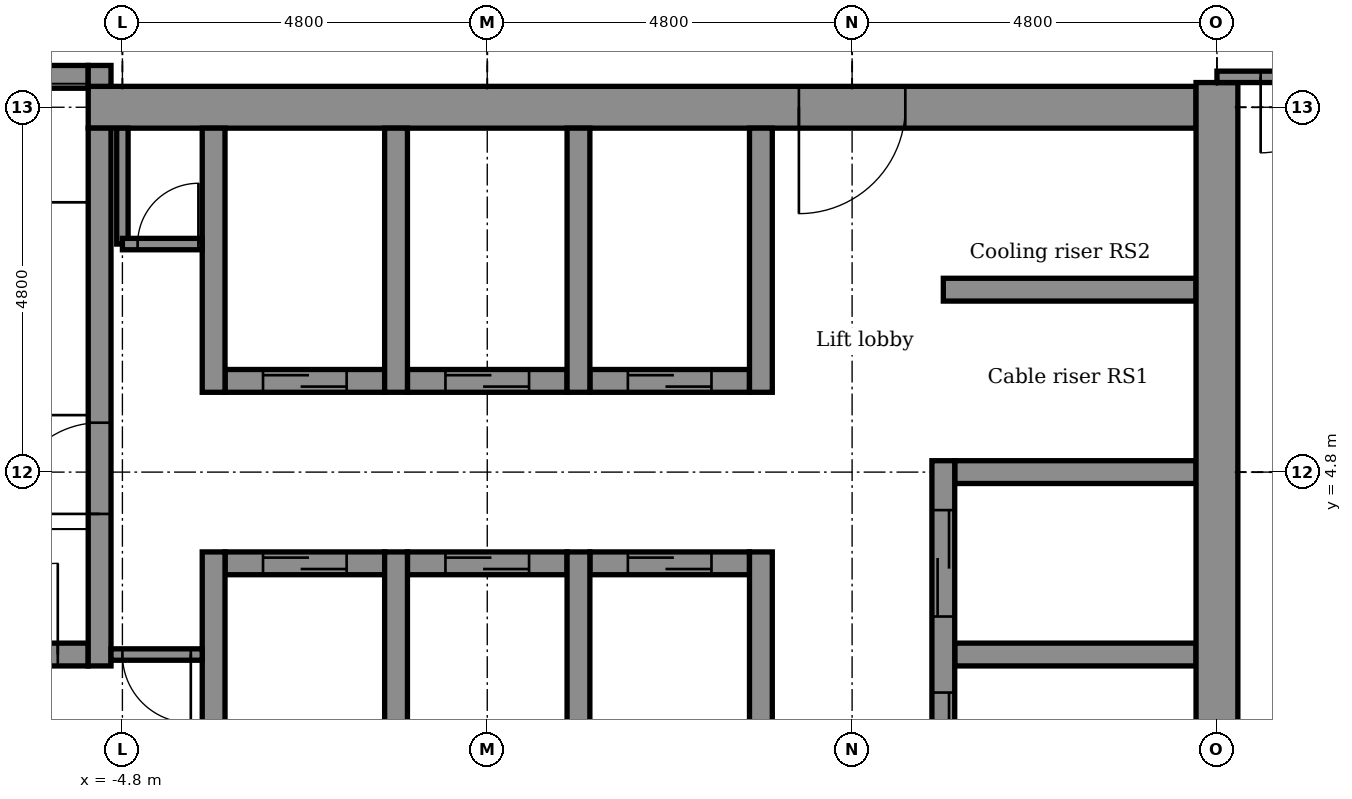
"""IFC4 building model, lengths in metres.
Left out: names, types, materials, properties, quantities, classifications, styles, units other than length and angle.
Written with IfcOpenShell. Run it as: python <this file> out.ifc"""

import sys

from ifc_helpers import new_model, si_unit, direction, frame, frame_2d, origin, place, context, subcontext, project, spatial, rectangle, extrude, element, fill, save


model = new_model("IFC4")
c1 = context("Model", 3, precision=1e-05, world=origin(), true_north=direction((0.0, 1.0)))
c2 = subcontext(c1, "Body", "Model", "MODEL_VIEW")
j1 = project(units=[si_unit("LENGTHUNIT", "METRE"), si_unit("PLANEANGLEUNIT", "RADIAN")], contexts=[c1])
p1 = place(None, origin())
s1 = spatial("IfcSite", under=j1, at=p1, CompositionType="ELEMENT")
p2 = place(p1, origin())
s2 = spatial("IfcBuilding", under=s1, at=p2, CompositionType="ELEMENT")
p3 = place(p2, frame((0.0, 0.0, 238.4)))
s3 = spatial("IfcBuildingStorey", under=s2, at=p3, CompositionType="ELEMENT", Elevation=238.4)
p4 = place(p3, frame((-7.25, 2.4, -0.15), z_axis=(0.0, 0.0, 1.0), x_axis=(1.0, 0.0, 0.0)))
e1 = element("IfcWall", 1, at=p4, inside=s3, PredefinedType="STANDARD", context=c2, shape_type="SweptSolid", body=[
    extrude(rectangle(XDim=2.0, YDim=0.3, at=frame_2d((1.0, 0.0))), origin(), (0.0, 0.0, 1.0), 3.9),
])
p5 = place(p4, frame((0.4, 0.0, 0.15)))
e2 = element("IfcOpeningElement", 2, at=p5, cuts=e1, PredefinedType="OPENING", context=c2, shape_type="SweptSolid", body=[
    extrude(rectangle(XDim=1.2, YDim=2.1, at=frame_2d((0.6, 1.05))), frame((0.0, 0.16, 0.0), z_axis=(0.0, -1.0, 0.0), x_axis=(1.0, 0.0, 0.0)), (0.0, 0.0, 1.0), 0.32),
])
p6 = place(p3, frame((6.15, 2.4, -0.15), z_axis=(0.0, 0.0, 1.0), x_axis=(1.0, 0.0, 0.0)))
e3 = element("IfcWall", 3, at=p6, inside=s3, PredefinedType="STANDARD", context=c2, shape_type="SweptSolid", body=[
    extrude(rectangle(XDim=3.175, YDim=0.3, at=frame_2d((1.587, 0.0))), origin(), (0.0, 0.0, 1.0), 3.9),
])
p7 = place(p3, frame((-3.45, 3.6, -0.15), z_axis=(0.0, 0.0, 1.0), x_axis=(1.0, 0.0, 0.0)))
e4 = element("IfcWall", 4, at=p7, inside=s3, PredefinedType="STANDARD", context=c2, shape_type="SweptSolid", body=[
    extrude(rectangle(XDim=2.1, YDim=0.3, at=frame_2d((1.05, 0.0))), origin(), (0.0, 0.0, 1.0), 3.9),
])
p8 = place(p7, frame((0.5, 0.0, 0.15)))
e5 = element("IfcOpeningElement", 5, at=p8, cuts=e4, PredefinedType="OPENING", context=c2, shape_type="SweptSolid", body=[
    extrude(rectangle(XDim=1.1, YDim=2.1, at=frame_2d((0.55, 1.05))), frame((0.0, 0.16, 0.0), z_axis=(0.0, -1.0, 0.0), x_axis=(1.0, 0.0, 0.0)), (0.0, 0.0, 1.0), 0.32),
])
p9 = place(p3, frame((-1.05, 3.6, -0.15), z_axis=(0.0, 0.0, 1.0), x_axis=(1.0, 0.0, 0.0)))
e6 = element("IfcWall", 6, at=p9, inside=s3, PredefinedType="STANDARD", context=c2, shape_type="SweptSolid", body=[
    extrude(rectangle(XDim=2.1, YDim=0.3, at=frame_2d((1.05, 0.0))), origin(), (0.0, 0.0, 1.0), 3.9),
])
p10 = place(p9, frame((0.5, 0.0, 0.15)))
e7 = element("IfcOpeningElement", 7, at=p10, cuts=e6, PredefinedType="OPENING", context=c2, shape_type="SweptSolid", body=[
    extrude(rectangle(XDim=1.1, YDim=2.1, at=frame_2d((0.55, 1.05))), frame((0.0, 0.16, 0.0), z_axis=(0.0, -1.0, 0.0), x_axis=(1.0, 0.0, 0.0)), (0.0, 0.0, 1.0), 0.32),
])
p11 = place(p3, frame((1.35, 3.6, -0.15), z_axis=(0.0, 0.0, 1.0), x_axis=(1.0, 0.0, 0.0)))
e8 = element("IfcWall", 8, at=p11, inside=s3, PredefinedType="STANDARD", context=c2, shape_type="SweptSolid", body=[
    extrude(rectangle(XDim=2.1, YDim=0.3, at=frame_2d((1.05, 0.0))), origin(), (0.0, 0.0, 1.0), 3.9),
])
p12 = place(p11, frame((0.5, 0.0, 0.15)))
e9 = element("IfcOpeningElement", 9, at=p12, cuts=e8, PredefinedType="OPENING", context=c2, shape_type="SweptSolid", body=[
    extrude(rectangle(XDim=1.1, YDim=2.1, at=frame_2d((0.55, 1.05))), frame((0.0, 0.16, 0.0), z_axis=(0.0, -1.0, 0.0), x_axis=(1.0, 0.0, 0.0)), (0.0, 0.0, 1.0), 0.32),
])
p13 = place(p3, frame((6.15, 4.8, -0.15), z_axis=(0.0, 0.0, 1.0), x_axis=(1.0, 0.0, 0.0)))
e10 = element("IfcWall", 10, at=p13, inside=s3, PredefinedType="STANDARD", context=c2, shape_type="SweptSolid", body=[
    extrude(rectangle(XDim=3.175, YDim=0.3, at=frame_2d((1.587, 0.0))), origin(), (0.0, 0.0, 1.0), 3.9),
])
p14 = place(p3, frame((-3.45, 6.0, -0.15), z_axis=(0.0, 0.0, 1.0), x_axis=(1.0, 0.0, 0.0)))
e11 = element("IfcWall", 11, at=p14, inside=s3, PredefinedType="STANDARD", context=c2, shape_type="SweptSolid", body=[
    extrude(rectangle(XDim=2.1, YDim=0.3, at=frame_2d((1.05, 0.0))), origin(), (0.0, 0.0, 1.0), 3.9),
])
p15 = place(p14, frame((0.5, 0.0, 0.15)))
e12 = element("IfcOpeningElement", 12, at=p15, cuts=e11, PredefinedType="OPENING", context=c2, shape_type="SweptSolid", body=[
    extrude(rectangle(XDim=1.1, YDim=2.1, at=frame_2d((0.55, 1.05))), frame((0.0, 0.16, 0.0), z_axis=(0.0, -1.0, 0.0), x_axis=(1.0, 0.0, 0.0)), (0.0, 0.0, 1.0), 0.32),
])
p16 = place(p3, frame((-1.05, 6.0, -0.15), z_axis=(0.0, 0.0, 1.0), x_axis=(1.0, 0.0, 0.0)))
e13 = element("IfcWall", 13, at=p16, inside=s3, PredefinedType="STANDARD", context=c2, shape_type="SweptSolid", body=[
    extrude(rectangle(XDim=2.1, YDim=0.3, at=frame_2d((1.05, 0.0))), origin(), (0.0, 0.0, 1.0), 3.9),
])
p17 = place(p16, frame((0.5, 0.0, 0.15)))
e14 = element("IfcOpeningElement", 14, at=p17, cuts=e13, PredefinedType="OPENING", context=c2, shape_type="SweptSolid", body=[
    extrude(rectangle(XDim=1.1, YDim=2.1, at=frame_2d((0.55, 1.05))), frame((0.0, 0.16, 0.0), z_axis=(0.0, -1.0, 0.0), x_axis=(1.0, 0.0, 0.0)), (0.0, 0.0, 1.0), 0.32),
])
p18 = place(p3, frame((1.35, 6.0, -0.15), z_axis=(0.0, 0.0, 1.0), x_axis=(1.0, 0.0, 0.0)))
e15 = element("IfcWall", 15, at=p18, inside=s3, PredefinedType="STANDARD", context=c2, shape_type="SweptSolid", body=[
    extrude(rectangle(XDim=2.1, YDim=0.3, at=frame_2d((1.05, 0.0))), origin(), (0.0, 0.0, 1.0), 3.9),
])
p19 = place(p18, frame((0.5, 0.0, 0.15)))
e16 = element("IfcOpeningElement", 16, at=p19, cuts=e15, PredefinedType="OPENING", context=c2, shape_type="SweptSolid", body=[
    extrude(rectangle(XDim=1.1, YDim=2.1, at=frame_2d((0.55, 1.05))), frame((0.0, 0.16, 0.0), z_axis=(0.0, -1.0, 0.0), x_axis=(1.0, 0.0, 0.0)), (0.0, 0.0, 1.0), 0.32),
])
p20 = place(p3, frame((6.0, 7.2, -0.15), z_axis=(0.0, 0.0, 1.0), x_axis=(1.0, 0.0, 0.0)))
e17 = element("IfcWall", 17, at=p20, inside=s3, PredefinedType="STANDARD", context=c2, shape_type="SweptSolid", body=[
    extrude(rectangle(XDim=3.325, YDim=0.3, at=frame_2d((1.663, 0.0))), origin(), (0.0, 0.0, 1.0), 3.9),
])
p21 = place(p3, frame((-5.25, 9.6, -0.15), z_axis=(0.0, 0.0, 1.0), x_axis=(1.0, 0.0, 0.0)))
e18 = element("IfcWall", 18, at=p21, inside=s3, PredefinedType="SHEAR", context=c2, shape_type="SweptSolid", body=[
    extrude(rectangle(XDim=14.575, YDim=0.55, at=frame_2d((7.288, 0.0))), origin(), (0.0, 0.0, 1.0), 3.9),
])
p22 = place(p21, frame((9.35, 0.0, 0.15)))
e19 = element("IfcOpeningElement", 19, at=p22, cuts=e18, PredefinedType="OPENING", context=c2, shape_type="SweptSolid", body=[
    extrude(rectangle(XDim=1.4, YDim=2.1, at=frame_2d((0.7, 1.05))), frame((0.0, 0.285, 0.0), z_axis=(0.0, -1.0, 0.0), x_axis=(1.0, 0.0, 0.0)), (0.0, 0.0, 1.0), 0.57),
])
p23 = place(p3, frame((-9.325, 10.0, -0.15), z_axis=(0.0, 0.0, 1.0), x_axis=(1.0, 0.0, 0.0)))
e20 = element("IfcWall", 20, at=p23, inside=s3, PredefinedType="STANDARD", context=c2, shape_type="SweptSolid", body=[
    extrude(rectangle(XDim=4.075, YDim=0.3, at=frame_2d((2.038, 0.0))), origin(), (0.0, 0.0, 1.0), 3.9),
])
p24 = place(p3, frame((-5.1, 2.25, -0.15), z_axis=(0.0, 0.0, 1.0), x_axis=(0.0, 1.0, 0.0)))
e21 = element("IfcWall", 21, at=p24, inside=s3, PredefinedType="STANDARD", context=c2, shape_type="SweptSolid", body=[
    extrude(rectangle(XDim=7.075, YDim=0.3, at=frame_2d((3.538, 0.0))), origin(), (0.0, 0.0, 1.0), 3.9),
])
p25 = place(p24, frame((2.0, 0.0, 0.15)))
e22 = element("IfcOpeningElement", 22, at=p25, cuts=e21, PredefinedType="OPENING", context=c2, shape_type="SweptSolid", body=[
    extrude(rectangle(XDim=1.2, YDim=2.1, at=frame_2d((0.6, 1.05))), frame((0.0, 0.16, 0.0), z_axis=(0.0, -1.0, 0.0), x_axis=(1.0, 0.0, 0.0)), (0.0, 0.0, 1.0), 0.32),
])
p26 = place(p3, frame((-5.1, 9.875, -0.15), z_axis=(0.0, 0.0, 1.0), x_axis=(0.0, 1.0, 0.0)))
e23 = element("IfcWall", 23, at=p26, inside=s3, PredefinedType="STANDARD", context=c2, shape_type="SweptSolid", body=[
    extrude(rectangle(XDim=0.275, YDim=0.3, at=frame_2d((0.137, 0.0))), origin(), (0.0, 0.0, 1.0), 3.9),
])
p27 = place(p3, frame((-3.6, -3.75, -0.15), z_axis=(0.0, 0.0, 1.0), x_axis=(0.0, 1.0, 0.0)))
e24 = element("IfcWall", 24, at=p27, inside=s3, PredefinedType="STANDARD", context=c2, shape_type="SweptSolid", body=[
    extrude(rectangle(XDim=7.5, YDim=0.3, at=frame_2d((3.75, 0.0))), origin(), (0.0, 0.0, 1.0), 3.9),
])
p28 = place(p3, frame((-3.6, 5.85, -0.15), z_axis=(0.0, 0.0, 1.0), x_axis=(0.0, 1.0, 0.0)))
e25 = element("IfcWall", 25, at=p28, inside=s3, PredefinedType="STANDARD", context=c2, shape_type="SweptSolid", body=[
    extrude(rectangle(XDim=3.475, YDim=0.3, at=frame_2d((1.737, 0.0))), origin(), (0.0, 0.0, 1.0), 3.9),
])
p29 = place(p3, frame((-1.2, -3.75, -0.15), z_axis=(0.0, 0.0, 1.0), x_axis=(0.0, 1.0, 0.0)))
e26 = element("IfcWall", 26, at=p29, inside=s3, PredefinedType="STANDARD", context=c2, shape_type="SweptSolid", body=[
    extrude(rectangle(XDim=7.5, YDim=0.3, at=frame_2d((3.75, 0.0))), origin(), (0.0, 0.0, 1.0), 3.9),
])
p30 = place(p3, frame((-1.2, 5.85, -0.15), z_axis=(0.0, 0.0, 1.0), x_axis=(0.0, 1.0, 0.0)))
e27 = element("IfcWall", 27, at=p30, inside=s3, PredefinedType="STANDARD", context=c2, shape_type="SweptSolid", body=[
    extrude(rectangle(XDim=3.475, YDim=0.3, at=frame_2d((1.737, 0.0))), origin(), (0.0, 0.0, 1.0), 3.9),
])
p31 = place(p3, frame((1.2, -3.75, -0.15), z_axis=(0.0, 0.0, 1.0), x_axis=(0.0, 1.0, 0.0)))
e28 = element("IfcWall", 28, at=p31, inside=s3, PredefinedType="STANDARD", context=c2, shape_type="SweptSolid", body=[
    extrude(rectangle(XDim=7.5, YDim=0.3, at=frame_2d((3.75, 0.0))), origin(), (0.0, 0.0, 1.0), 3.9),
])
p32 = place(p3, frame((1.2, 5.85, -0.15), z_axis=(0.0, 0.0, 1.0), x_axis=(0.0, 1.0, 0.0)))
e29 = element("IfcWall", 29, at=p32, inside=s3, PredefinedType="STANDARD", context=c2, shape_type="SweptSolid", body=[
    extrude(rectangle(XDim=3.475, YDim=0.3, at=frame_2d((1.737, 0.0))), origin(), (0.0, 0.0, 1.0), 3.9),
])
p33 = place(p3, frame((3.6, -3.75, -0.15), z_axis=(0.0, 0.0, 1.0), x_axis=(0.0, 1.0, 0.0)))
e30 = element("IfcWall", 30, at=p33, inside=s3, PredefinedType="STANDARD", context=c2, shape_type="SweptSolid", body=[
    extrude(rectangle(XDim=7.5, YDim=0.3, at=frame_2d((3.75, 0.0))), origin(), (0.0, 0.0, 1.0), 3.9),
])
p34 = place(p3, frame((3.6, 5.85, -0.15), z_axis=(0.0, 0.0, 1.0), x_axis=(0.0, 1.0, 0.0)))
e31 = element("IfcWall", 31, at=p34, inside=s3, PredefinedType="STANDARD", context=c2, shape_type="SweptSolid", body=[
    extrude(rectangle(XDim=3.475, YDim=0.3, at=frame_2d((1.737, 0.0))), origin(), (0.0, 0.0, 1.0), 3.9),
])
p35 = place(p3, frame((6.0, -2.55, -0.15), z_axis=(0.0, 0.0, 1.0), x_axis=(0.0, 1.0, 0.0)))
e32 = element("IfcWall", 32, at=p35, inside=s3, PredefinedType="STANDARD", context=c2, shape_type="SweptSolid", body=[
    extrude(rectangle(XDim=7.5, YDim=0.3, at=frame_2d((3.75, 0.0))), origin(), (0.0, 0.0, 1.0), 3.9),
])
p36 = place(p35, frame((0.65, 0.0, 0.15)))
e33 = element("IfcOpeningElement", 33, at=p36, cuts=e32, PredefinedType="OPENING", context=c2, shape_type="SweptSolid", body=[
    extrude(rectangle(XDim=1.4, YDim=2.1, at=frame_2d((0.7, 1.05))), frame((0.0, 0.16, 0.0), z_axis=(0.0, -1.0, 0.0), x_axis=(1.0, 0.0, 0.0)), (0.0, 0.0, 1.0), 0.32),
])
p37 = place(p35, frame((3.05, 0.0, 0.15)))
e34 = element("IfcOpeningElement", 34, at=p37, cuts=e32, PredefinedType="OPENING", context=c2, shape_type="SweptSolid", body=[
    extrude(rectangle(XDim=1.4, YDim=2.1, at=frame_2d((0.7, 1.05))), frame((0.0, 0.16, 0.0), z_axis=(0.0, -1.0, 0.0), x_axis=(1.0, 0.0, 0.0)), (0.0, 0.0, 1.0), 0.32),
])
p38 = place(p35, frame((5.45, 0.0, 0.15)))
e35 = element("IfcOpeningElement", 35, at=p38, cuts=e32, PredefinedType="OPENING", context=c2, shape_type="SweptSolid", body=[
    extrude(rectangle(XDim=1.4, YDim=2.1, at=frame_2d((0.7, 1.05))), frame((0.0, 0.16, 0.0), z_axis=(0.0, -1.0, 0.0), x_axis=(1.0, 0.0, 0.0)), (0.0, 0.0, 1.0), 0.32),
])
p39 = place(p3, frame((9.6, -10.15, -0.15), z_axis=(0.0, 0.0, 1.0), x_axis=(0.0, 1.0, 0.0)))
e36 = element("IfcWall", 36, at=p39, inside=s3, PredefinedType="SHEAR", context=c2, shape_type="SweptSolid", body=[
    extrude(rectangle(XDim=20.075, YDim=0.55, at=frame_2d((10.038, 0.0))), origin(), (0.0, 0.0, 1.0), 3.9),
])
p40 = place(p3, frame((-4.8, 7.8, 0.0), z_axis=(0.0, 0.0, 1.0), x_axis=(0.0, 1.0, 0.0)))
e37 = element("IfcWall", 37, at=p40, inside=s3, PredefinedType="PARTITIONING", context=c2, shape_type="SweptSolid", body=[
    extrude(rectangle(XDim=1.525, YDim=0.15, at=frame_2d((0.762, 0.0))), origin(), (0.0, 0.0, 1.0), 3.75),
])
p41 = place(p3, frame((-4.8, 7.8, 0.0), z_axis=(0.0, 0.0, 1.0), x_axis=(1.0, 0.0, 0.0)))
e38 = element("IfcWall", 38, at=p41, inside=s3, PredefinedType="PARTITIONING", context=c2, shape_type="SweptSolid", body=[
    extrude(rectangle(XDim=1.05, YDim=0.15, at=frame_2d((0.525, 0.0))), origin(), (0.0, 0.0, 1.0), 3.75),
])
p42 = place(p41, frame((0.2, 0.0, 0.0)))
e39 = element("IfcOpeningElement", 39, at=p42, cuts=e38, PredefinedType="OPENING", context=c2, shape_type="SweptSolid", body=[
    extrude(rectangle(XDim=0.8, YDim=2.1, at=frame_2d((0.4, 1.05))), frame((0.0, 0.085, 0.0), z_axis=(0.0, -1.0, 0.0), x_axis=(1.0, 0.0, 0.0)), (0.0, 0.0, 1.0), 0.17),
])
p43 = place(p3, frame((9.6, 10.0, 0.0), z_axis=(0.0, 0.0, 1.0), x_axis=(1.0, 0.0, 0.0)))
e40 = element("IfcWall", 40, at=p43, inside=s3, PredefinedType="PARTITIONING", context=c2, shape_type="SweptSolid", body=[
    extrude(rectangle(XDim=4.955, YDim=0.15, at=frame_2d((2.477, 0.0))), origin(), (0.0, 0.0, 1.0), 3.75),
])
p44 = place(p43, frame((0.575, 0.0, 0.0)))
e41 = element("IfcOpeningElement", 41, at=p44, cuts=e40, PredefinedType="OPENING", context=c2, shape_type="SweptSolid", body=[
    extrude(rectangle(XDim=1.0, YDim=2.1, at=frame_2d((0.5, 1.05))), frame((0.0, 0.085, 0.0), z_axis=(0.0, -1.0, 0.0), x_axis=(1.0, 0.0, 0.0)), (0.0, 0.0, 1.0), 0.17),
])
p45 = place(p3, frame((-4.95, 2.4, 0.0), z_axis=(0.0, 0.0, 1.0), x_axis=(1.0, 0.0, 0.0)))
e42 = element("IfcWall", 42, at=p45, inside=s3, PredefinedType="PARTITIONING", context=c2, shape_type="SweptSolid", body=[
    extrude(rectangle(XDim=1.2, YDim=0.15, at=frame_2d((0.6, 0.0))), origin(), (0.0, 0.0, 1.0), 3.75),
])
p46 = place(p45, frame((0.15, 0.0, 0.0)))
e43 = element("IfcOpeningElement", 43, at=p46, cuts=e42, PredefinedType="OPENING", context=c2, shape_type="SweptSolid", body=[
    extrude(rectangle(XDim=0.9, YDim=2.1, at=frame_2d((0.45, 1.05))), frame((0.0, 0.085, 0.0), z_axis=(0.0, -1.0, 0.0), x_axis=(1.0, 0.0, 0.0)), (0.0, 0.0, 1.0), 0.17),
])
p47 = place(p42, origin())
e44 = element("IfcDoor", 44, at=p47, inside=s3, OperationType="SINGLE_SWING_RIGHT", PredefinedType="DOOR", context=c2, shape_type="SweptSolid", body=[
    extrude(rectangle(XDim=0.8, YDim=2.1, at=frame_2d((0.4, 1.05))), frame((0.0, 0.025, 0.0), z_axis=(0.0, -1.0, 0.0), x_axis=(1.0, 0.0, 0.0)), (0.0, 0.0, 1.0), 0.05),
])
fill(e39, e44)
p48 = place(p44, frame((1.0, 0.0, 0.0), z_axis=(0.0, 0.0, 1.0), x_axis=(-1.0, 0.0, 0.0)))
e45 = element("IfcDoor", 45, at=p48, inside=s3, OperationType="SINGLE_SWING_LEFT", PredefinedType="DOOR", context=c2, shape_type="SweptSolid", body=[
    extrude(rectangle(XDim=1.0, YDim=2.1, at=frame_2d((0.5, 1.05))), frame((0.0, 0.025, 0.0), z_axis=(0.0, -1.0, 0.0), x_axis=(1.0, 0.0, 0.0)), (0.0, 0.0, 1.0), 0.05),
])
fill(e41, e45)
p49 = place(p37, origin())
e46 = element("IfcDoor", 46, at=p49, inside=s3, OperationType="DOUBLE_DOOR_SLIDING", PredefinedType="DOOR", context=c2, shape_type="SweptSolid", body=[
    extrude(rectangle(XDim=1.4, YDim=2.1, at=frame_2d((0.7, 1.05))), frame((0.0, 0.025, 0.0), z_axis=(0.0, -1.0, 0.0), x_axis=(1.0, 0.0, 0.0)), (0.0, 0.0, 1.0), 0.05),
])
fill(e34, e46)
p50 = place(p38, origin())
e47 = element("IfcDoor", 47, at=p50, inside=s3, OperationType="DOUBLE_DOOR_SLIDING", PredefinedType="DOOR", context=c2, shape_type="SweptSolid", body=[
    extrude(rectangle(XDim=1.4, YDim=2.1, at=frame_2d((0.7, 1.05))), frame((0.0, 0.025, 0.0), z_axis=(0.0, -1.0, 0.0), x_axis=(1.0, 0.0, 0.0)), (0.0, 0.0, 1.0), 0.05),
])
fill(e35, e47)
p51 = place(p15, origin())
e48 = element("IfcDoor", 48, at=p51, inside=s3, OperationType="DOUBLE_DOOR_SLIDING", PredefinedType="DOOR", context=c2, shape_type="SweptSolid", body=[
    extrude(rectangle(XDim=1.1, YDim=2.1, at=frame_2d((0.55, 1.05))), frame((0.0, 0.025, 0.0), z_axis=(0.0, -1.0, 0.0), x_axis=(1.0, 0.0, 0.0)), (0.0, 0.0, 1.0), 0.05),
])
fill(e12, e48)
p52 = place(p17, origin())
e49 = element("IfcDoor", 49, at=p52, inside=s3, OperationType="DOUBLE_DOOR_SLIDING", PredefinedType="DOOR", context=c2, shape_type="SweptSolid", body=[
    extrude(rectangle(XDim=1.1, YDim=2.1, at=frame_2d((0.55, 1.05))), frame((0.0, 0.025, 0.0), z_axis=(0.0, -1.0, 0.0), x_axis=(1.0, 0.0, 0.0)), (0.0, 0.0, 1.0), 0.05),
])
fill(e14, e49)
p53 = place(p19, origin())
e50 = element("IfcDoor", 50, at=p53, inside=s3, OperationType="DOUBLE_DOOR_SLIDING", PredefinedType="DOOR", context=c2, shape_type="SweptSolid", body=[
    extrude(rectangle(XDim=1.1, YDim=2.1, at=frame_2d((0.55, 1.05))), frame((0.0, 0.025, 0.0), z_axis=(0.0, -1.0, 0.0), x_axis=(1.0, 0.0, 0.0)), (0.0, 0.0, 1.0), 0.05),
])
fill(e16, e50)
p54 = place(p8, origin())
e51 = element("IfcDoor", 51, at=p54, inside=s3, OperationType="DOUBLE_DOOR_SLIDING", PredefinedType="DOOR", context=c2, shape_type="SweptSolid", body=[
    extrude(rectangle(XDim=1.1, YDim=2.1, at=frame_2d((0.55, 1.05))), frame((0.0, 0.025, 0.0), z_axis=(0.0, -1.0, 0.0), x_axis=(1.0, 0.0, 0.0)), (0.0, 0.0, 1.0), 0.05),
])
fill(e5, e51)
p55 = place(p10, origin())
e52 = element("IfcDoor", 52, at=p55, inside=s3, OperationType="DOUBLE_DOOR_SLIDING", PredefinedType="DOOR", context=c2, shape_type="SweptSolid", body=[
    extrude(rectangle(XDim=1.1, YDim=2.1, at=frame_2d((0.55, 1.05))), frame((0.0, 0.025, 0.0), z_axis=(0.0, -1.0, 0.0), x_axis=(1.0, 0.0, 0.0)), (0.0, 0.0, 1.0), 0.05),
])
fill(e7, e52)
p56 = place(p12, origin())
e53 = element("IfcDoor", 53, at=p56, inside=s3, OperationType="DOUBLE_DOOR_SLIDING", PredefinedType="DOOR", context=c2, shape_type="SweptSolid", body=[
    extrude(rectangle(XDim=1.1, YDim=2.1, at=frame_2d((0.55, 1.05))), frame((0.0, 0.025, 0.0), z_axis=(0.0, -1.0, 0.0), x_axis=(1.0, 0.0, 0.0)), (0.0, 0.0, 1.0), 0.05),
])
fill(e9, e53)
p57 = place(p25, origin())
e54 = element("IfcDoor", 54, at=p57, inside=s3, OperationType="SINGLE_SWING_LEFT", PredefinedType="DOOR", context=c2, shape_type="SweptSolid", body=[
    extrude(rectangle(XDim=1.2, YDim=2.1, at=frame_2d((0.6, 1.05))), frame((0.0, 0.025, 0.0), z_axis=(0.0, -1.0, 0.0), x_axis=(1.0, 0.0, 0.0)), (0.0, 0.0, 1.0), 0.05),
])
fill(e22, e54)
p58 = place(p22, frame((1.4, 0.0, 0.0), z_axis=(0.0, 0.0, 1.0), x_axis=(-1.0, 0.0, 0.0)))
e55 = element("IfcDoor", 55, at=p58, inside=s3, OperationType="SINGLE_SWING_LEFT", PredefinedType="DOOR", context=c2, shape_type="SweptSolid", body=[
    extrude(rectangle(XDim=1.4, YDim=2.1, at=frame_2d((0.7, 1.05))), frame((0.0, 0.025, 0.0), z_axis=(0.0, -1.0, 0.0), x_axis=(1.0, 0.0, 0.0)), (0.0, 0.0, 1.0), 0.05),
])
fill(e19, e55)
p59 = place(p46, frame((0.9, 0.0, 0.0), z_axis=(0.0, 0.0, 1.0), x_axis=(-1.0, 0.0, 0.0)))
e56 = element("IfcDoor", 56, at=p59, inside=s3, OperationType="SINGLE_SWING_RIGHT", PredefinedType="DOOR", context=c2, shape_type="SweptSolid", body=[
    extrude(rectangle(XDim=0.9, YDim=2.1, at=frame_2d((0.45, 1.05))), frame((0.0, 0.025, 0.0), z_axis=(0.0, -1.0, 0.0), x_axis=(1.0, 0.0, 0.0)), (0.0, 0.0, 1.0), 0.05),
])
fill(e43, e56)
p60 = place(p5, origin())
e57 = element("IfcDoor", 57, at=p60, inside=s3, OperationType="SINGLE_SWING_RIGHT", PredefinedType="DOOR", context=c2, shape_type="SweptSolid", body=[
    extrude(rectangle(XDim=1.2, YDim=2.1, at=frame_2d((0.6, 1.05))), frame((0.0, 0.025, 0.0), z_axis=(0.0, -1.0, 0.0), x_axis=(1.0, 0.0, 0.0)), (0.0, 0.0, 1.0), 0.05),
])
fill(e2, e57)
save(model, sys.argv[1])
